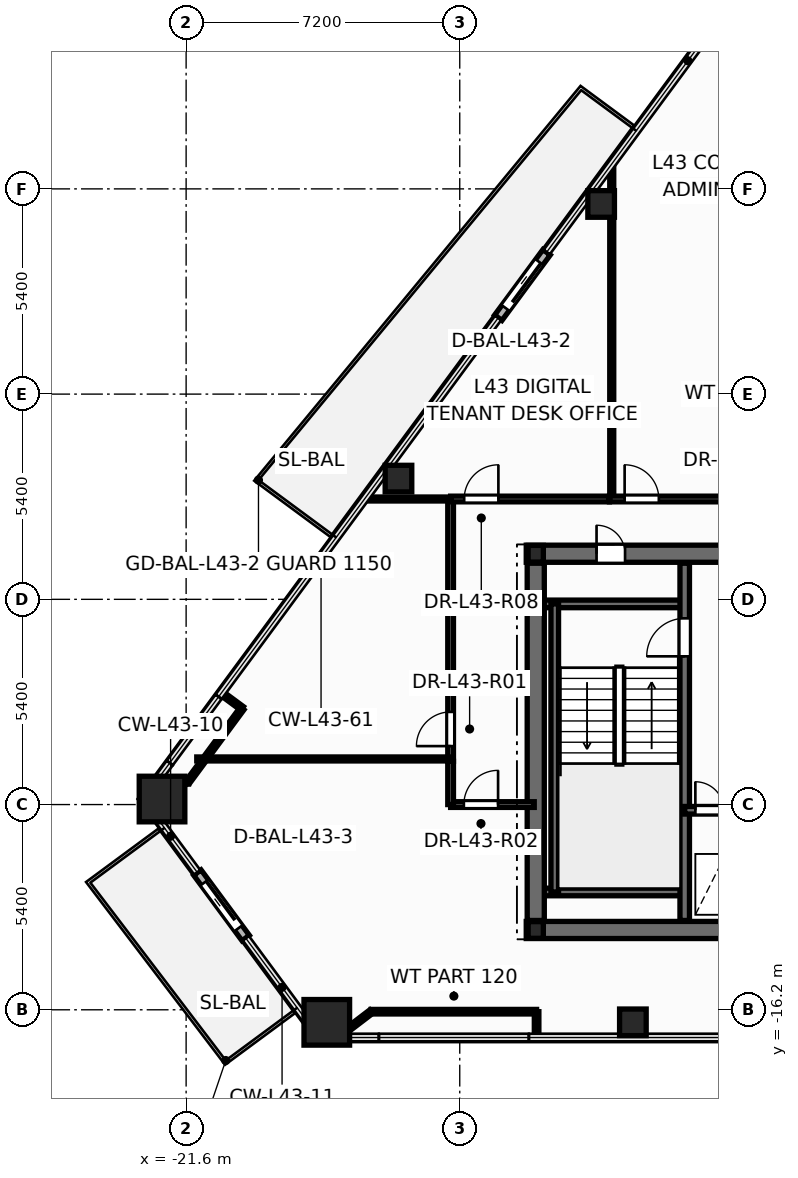
"""IFC4 building model, lengths in metres.
Left out: names, types, materials, properties, quantities, classifications, styles, units other than length and angle.
Written with IfcOpenShell. Run it as: python <this file> out.ifc"""

import sys

from ifc_helpers import new_model, si_unit, direction, frame, frame_2d, origin, origin_2d, place, context, subcontext, project, spatial, rectangle, hollow_rectangle, hollow_circle, i_section, extrude, element, fill, save


model = new_model("IFC4")
c1 = context("Model", 3, precision=1e-05, world=origin(), true_north=direction((0.0, 1.0)))
c2 = subcontext(c1, "Body", "Model", "MODEL_VIEW")
j1 = project(units=[si_unit("LENGTHUNIT", "METRE"), si_unit("PLANEANGLEUNIT", "RADIAN")], contexts=[c1])
p1 = place(None, origin())
s1 = spatial("IfcSite", under=j1, at=p1, CompositionType="ELEMENT")
p2 = place(p1, origin())
s2 = spatial("IfcBuilding", under=s1, at=p2, CompositionType="ELEMENT")
p3 = place(p2, frame((0.0, 0.0, 165.3)))
s3 = spatial("IfcBuildingStorey", under=s2, at=p3, CompositionType="ELEMENT", Elevation=165.3)
for number, where, z_axis, x_axis in (
    (1, (-22.234, -10.655, 0.0), (0.0, 0.0, 1.0), (1.0, 0.0, 0.0)),
    (2, (-17.898, -16.53, 0.0), (0.0, 0.0, 1.0), (1.0, 0.0, 0.0)),
):
    element("IfcColumn", number, at=place(p3, frame(where, z_axis=z_axis, x_axis=x_axis)), inside=s3, PredefinedType="COLUMN", context=c2, shape_type="SweptSolid", body=[
        extrude(hollow_rectangle(XDim=1.2, YDim=1.2, WallThickness=0.055, at=origin_2d()), origin(), (0.0, 0.0, 1.0), 3.6),
    ])
for number, where, z_axis, x_axis in (
    (3, (-9.844, -16.53, 0.0), (0.0, 0.0, 1.0), (1.0, 0.0, 0.0)),
    (4, (-10.679, 5.003, 0.0), (0.0, 0.0, 1.0), (1.0, 0.0, 0.0)),
    (5, (-16.012, -2.223, 0.0), (0.0, 0.0, 1.0), (1.0, 0.0, 0.0)),
):
    element("IfcColumn", number, at=place(p3, frame(where, z_axis=z_axis, x_axis=x_axis)), inside=s3, PredefinedType="COLUMN", context=c2, shape_type="SweptSolid", body=[
        extrude(hollow_circle(Radius=0.35, WallThickness=0.03, at=origin_2d()), origin(), (0.0, 0.0, 1.0), 3.6),
    ])
for number, where, z_axis, x_axis in (
    (6, (-12.4, -14.1, 0.0), (0.0, 0.0, 1.0), (1.0, 0.0, 0.0)),
    (7, (-12.4, -4.2, 0.0), (0.0, 0.0, 1.0), (1.0, 0.0, 0.0)),
):
    element("IfcColumn", number, at=place(p3, frame(where, z_axis=z_axis, x_axis=x_axis)), inside=s3, PredefinedType="COLUMN", context=c2, shape_type="SweptSolid", body=[
        extrude(i_section(OverallWidth=0.4, OverallDepth=0.44, WebThickness=0.028, FlangeThickness=0.04, at=origin_2d()), origin(), (0.0, 0.0, 1.0), 3.6),
    ])
p4 = place(p3, frame((-12.115, 3.731, -0.015), z_axis=(0.0, 0.0, 1.0), x_axis=(-0.593794270714, -0.804616905158, 0.0)))
e8 = element("IfcWall", 8, at=p4, inside=s3, PredefinedType="STANDARD", context=c2, shape_type="SweptSolid", body=[
    extrude(rectangle(XDim=2.14, YDim=0.24, at=frame_2d((1.07, 0.0))), origin(), (0.0, 0.0, 1.0), 2.737),
])
p5 = place(p4, frame((0.32, 0.0, 0.015)))
e9 = element("IfcOpeningElement", 9, at=p5, cuts=e8, PredefinedType="OPENING", context=c2, shape_type="SweptSolid", body=[
    extrude(rectangle(XDim=1.506, YDim=2.204, at=frame_2d((0.75, 1.102))), frame((0.0, 0.13, 0.0), z_axis=(0.0, -1.0, 0.0), x_axis=(1.0, 0.0, 0.0)), (0.0, 0.0, 1.0), 0.26),
])
p6 = place(p3, frame((-21.303, -12.589, -0.015), z_axis=(0.0, 0.0, 1.0), x_axis=(0.593794270714, -0.804616905158, 0.0)))
e10 = element("IfcWall", 10, at=p6, inside=s3, PredefinedType="STANDARD", context=c2, shape_type="SweptSolid", body=[
    extrude(rectangle(XDim=2.14, YDim=0.24, at=frame_2d((1.07, 0.0))), origin(), (0.0, 0.0, 1.0), 2.737),
])
p7 = place(p6, frame((0.32, 0.0, 0.015)))
e11 = element("IfcOpeningElement", 11, at=p7, cuts=e10, PredefinedType="OPENING", context=c2, shape_type="SweptSolid", body=[
    extrude(rectangle(XDim=1.506, YDim=2.204, at=frame_2d((0.75, 1.102))), frame((0.0, 0.13, 0.0), z_axis=(0.0, -1.0, 0.0), x_axis=(1.0, 0.0, 0.0)), (0.0, 0.0, 1.0), 0.26),
])
p8 = place(p3, frame((-12.65, -14.1, 0.0), z_axis=(0.0, 0.0, 1.0), x_axis=(1.0, 0.0, 0.0)))
e12 = element("IfcWall", 12, at=p8, inside=s3, PredefinedType="SHEAR", context=c2, shape_type="SweptSolid", body=[
    extrude(rectangle(XDim=25.3, YDim=0.45, at=frame_2d((12.65, 0.0))), origin(), (0.0, 0.0, 1.0), 3.6),
])
p9 = place(p3, frame((-12.65, -4.2, 0.0), z_axis=(0.0, 0.0, 1.0), x_axis=(1.0, 0.0, 0.0)))
e13 = element("IfcWall", 13, at=p9, inside=s3, PredefinedType="SHEAR", context=c2, shape_type="SweptSolid", body=[
    extrude(rectangle(XDim=25.3, YDim=0.45, at=frame_2d((12.65, 0.0))), origin(), (0.0, 0.0, 1.0), 3.6),
])
p10 = place(p9, frame((1.85, 0.0, 0.0)))
e14 = element("IfcOpeningElement", 14, at=p10, cuts=e13, PredefinedType="OPENING", context=c2, shape_type="SweptSolid", body=[
    extrude(rectangle(XDim=0.756, YDim=2.054, at=frame_2d((0.375, 1.027))), frame((0.0, 0.235, 0.0), z_axis=(0.0, -1.0, 0.0), x_axis=(1.0, 0.0, 0.0)), (0.0, 0.0, 1.0), 0.47),
])
p11 = place(p9, frame((21.85, 0.0, 0.0)))
e15 = element("IfcOpeningElement", 15, at=p11, cuts=e13, PredefinedType="OPENING", context=c2, shape_type="SweptSolid", body=[
    extrude(rectangle(XDim=0.756, YDim=2.054, at=frame_2d((0.375, 1.027))), frame((0.0, 0.235, 0.0), z_axis=(0.0, -1.0, 0.0), x_axis=(1.0, 0.0, 0.0)), (0.0, 0.0, 1.0), 0.47),
])
p12 = place(p9, frame((23.5, 0.0, 0.0)))
e16 = element("IfcOpeningElement", 16, at=p12, cuts=e13, PredefinedType="OPENING", context=c2, shape_type="SweptSolid", body=[
    extrude(rectangle(XDim=0.756, YDim=2.054, at=frame_2d((0.375, 1.027))), frame((0.0, 0.235, 0.0), z_axis=(0.0, -1.0, 0.0), x_axis=(1.0, 0.0, 0.0)), (0.0, 0.0, 1.0), 0.47),
])
p13 = place(p9, frame((5.85, 0.0, 0.0)))
e17 = element("IfcOpeningElement", 17, at=p13, cuts=e13, PredefinedType="OPENING", context=c2, shape_type="SweptSolid", body=[
    extrude(rectangle(XDim=1.006, YDim=2.104, at=frame_2d((0.5, 1.052))), frame((0.0, 0.235, 0.0), z_axis=(0.0, -1.0, 0.0), x_axis=(1.0, 0.0, 0.0)), (0.0, 0.0, 1.0), 0.47),
])
p14 = place(p9, frame((10.35, 0.0, 0.0)))
e18 = element("IfcOpeningElement", 18, at=p14, cuts=e13, PredefinedType="OPENING", context=c2, shape_type="SweptSolid", body=[
    extrude(rectangle(XDim=1.406, YDim=2.154, at=frame_2d((0.7, 1.077))), frame((0.0, 0.235, 0.0), z_axis=(0.0, -1.0, 0.0), x_axis=(1.0, 0.0, 0.0)), (0.0, 0.0, 1.0), 0.47),
])
p15 = place(p9, frame((18.45, 0.0, 0.0)))
e19 = element("IfcOpeningElement", 19, at=p15, cuts=e13, PredefinedType="OPENING", context=c2, shape_type="SweptSolid", body=[
    extrude(rectangle(XDim=1.006, YDim=2.104, at=frame_2d((0.5, 1.052))), frame((0.0, 0.235, 0.0), z_axis=(0.0, -1.0, 0.0), x_axis=(1.0, 0.0, 0.0)), (0.0, 0.0, 1.0), 0.47),
])
for number, where, z_axis, x_axis in (
    (20, (-12.35, -5.52, 0.0), (0.0, 0.0, 1.0), (1.0, 0.0, 0.0)),
    (21, (-12.35, -13.1, 0.0), (0.0, 0.0, 1.0), (1.0, 0.0, 0.0)),
):
    element("IfcWall", number, at=place(p3, frame(where, z_axis=z_axis, x_axis=x_axis)), inside=s3, PredefinedType="SOLIDWALL", context=c2, shape_type="SweptSolid", body=[
        extrude(rectangle(XDim=3.87, YDim=0.2, at=frame_2d((1.935, 0.0))), origin(), (0.0, 0.0, 1.0), 3.6),
    ])
p16 = place(p3, frame((-11.9, -13.1, 0.0), z_axis=(0.0, 0.0, 1.0), x_axis=(0.0, 1.0, 0.0)))
e22 = element("IfcWall", 22, at=p16, inside=s3, PredefinedType="SOLIDWALL", context=c2, shape_type="SweptSolid", body=[
    extrude(rectangle(XDim=7.58, YDim=0.2, at=frame_2d((3.79, 0.0))), origin(), (0.0, 0.0, 1.0), 3.6),
])
p17 = place(p3, frame((-8.48, -13.85, 0.0), z_axis=(0.0, 0.0, 1.0), x_axis=(0.0, 1.0, 0.0)))
e23 = element("IfcWall", 23, at=p17, inside=s3, PredefinedType="SHEAR", context=c2, shape_type="SweptSolid", body=[
    extrude(rectangle(XDim=9.4, YDim=0.25, at=frame_2d((4.7, 0.0))), origin(), (0.0, 0.0, 1.0), 3.6),
])
p18 = place(p17, frame((6.95, 0.0, 0.0)))
e24 = element("IfcOpeningElement", 24, at=p18, cuts=e23, PredefinedType="OPENING", context=c2, shape_type="SweptSolid", body=[
    extrude(rectangle(XDim=1.006, YDim=2.104, at=frame_2d((0.5, 1.052))), frame((0.0, 0.135, 0.0), z_axis=(0.0, -1.0, 0.0), x_axis=(1.0, 0.0, 0.0)), (0.0, 0.0, 1.0), 0.27),
])
p19 = place(p3, frame((-8.48, -10.95, 0.0), z_axis=(0.0, 0.0, 1.0), x_axis=(1.0, 0.0, 0.0)))
e25 = element("IfcWall", 25, at=p19, inside=s3, PredefinedType="SOLIDWALL", context=c2, shape_type="SweptSolid", body=[
    extrude(rectangle(XDim=3.36, YDim=0.2, at=frame_2d((1.68, 0.0))), origin(), (0.0, 0.0, 1.0), 3.6),
])
p20 = place(p19, frame((0.28, 0.0, 0.0)))
e26 = element("IfcOpeningElement", 26, at=p20, cuts=e25, PredefinedType="OPENING", context=c2, shape_type="SweptSolid", body=[
    extrude(rectangle(XDim=0.756, YDim=2.054, at=frame_2d((0.375, 1.027))), frame((0.0, 0.11, 0.0), z_axis=(0.0, -1.0, 0.0), x_axis=(1.0, 0.0, 0.0)), (0.0, 0.0, 1.0), 0.22),
])
p21 = place(p19, frame((1.85, 0.0, 0.0)))
e27 = element("IfcOpeningElement", 27, at=p21, cuts=e25, PredefinedType="OPENING", context=c2, shape_type="SweptSolid", body=[
    extrude(rectangle(XDim=1.106, YDim=2.104, at=frame_2d((0.55, 1.052))), frame((0.0, 0.11, 0.0), z_axis=(0.0, -1.0, 0.0), x_axis=(1.0, 0.0, 0.0)), (0.0, 0.0, 1.0), 0.22),
])
p22 = place(p3, frame((-12.4, -13.85, 0.0), z_axis=(0.0, 0.0, 1.0), x_axis=(0.0, 1.0, 0.0)))
e28 = element("IfcWall", 28, at=p22, inside=s3, PredefinedType="SHEAR", context=c2, shape_type="SweptSolid", body=[
    extrude(rectangle(XDim=9.4, YDim=0.45, at=frame_2d((4.7, 0.0))), origin(), (0.0, 0.0, 1.0), 3.6),
])
p23 = place(p3, frame((-10.4, -2.76, 0.0), z_axis=(0.0, 0.0, 1.0), x_axis=(0.0, 1.0, 0.0)))
e29 = element("IfcWall", 29, at=p23, inside=s3, PredefinedType="PARTITIONING", context=c2, shape_type="SweptSolid", body=[
    extrude(rectangle(XDim=8.815, YDim=0.105, at=frame_2d((4.408, 0.0))), origin(), (0.0, 0.0, 1.0), 2.547),
])
p24 = place(p3, frame((-14.64, -9.66, 0.0), z_axis=(0.0, 0.0, 1.0), x_axis=(0.0, 1.0, 0.0)))
e30 = element("IfcWall", 30, at=p24, inside=s3, PredefinedType="PARTITIONING", context=c2, shape_type="SweptSolid", body=[
    extrude(rectangle(XDim=6.9, YDim=0.15, at=frame_2d((3.45, 0.0))), origin(), (0.0, 0.0, 1.0), 2.255),
])
p25 = place(p24, frame((0.398, 0.0, 0.0)))
e31 = element("IfcOpeningElement", 31, at=p25, cuts=e30, PredefinedType="OPENING", context=c2, shape_type="SweptSolid", body=[
    extrude(rectangle(XDim=0.906, YDim=2.104, at=frame_2d((0.45, 1.052))), frame((0.0, 0.085, 0.0), z_axis=(0.0, -1.0, 0.0), x_axis=(1.0, 0.0, 0.0)), (0.0, 0.0, 1.0), 0.17),
])
p26 = place(p3, frame((-21.32, -9.6, 0.0), z_axis=(0.0, 0.0, 1.0), x_axis=(1.0, 0.0, 0.0)))
e32 = element("IfcWall", 32, at=p26, inside=s3, PredefinedType="PARTITIONING", context=c2, shape_type="SweptSolid", body=[
    extrude(rectangle(XDim=6.68, YDim=0.105, at=frame_2d((3.34, 0.0))), origin(), (0.0, 0.0, 1.0), 2.255),
])
p27 = place(p3, frame((-10.46, -2.76, 0.0), z_axis=(0.0, 0.0, 1.0), x_axis=(1.0, 0.0, 0.0)))
e33 = element("IfcWall", 33, at=p27, inside=s3, PredefinedType="PARTITIONING", context=c2, shape_type="SweptSolid", body=[
    extrude(rectangle(XDim=6.12, YDim=0.15, at=frame_2d((3.06, 0.0))), origin(), (0.0, 0.0, 1.0), 2.255),
])
p28 = place(p27, frame((0.399, 0.0, 0.0)))
e34 = element("IfcOpeningElement", 34, at=p28, cuts=e33, PredefinedType="OPENING", context=c2, shape_type="SweptSolid", body=[
    extrude(rectangle(XDim=0.906, YDim=2.104, at=frame_2d((0.45, 1.052))), frame((0.0, 0.085, 0.0), z_axis=(0.0, -1.0, 0.0), x_axis=(1.0, 0.0, 0.0)), (0.0, 0.0, 1.0), 0.17),
])
p29 = place(p3, frame((-16.731, -16.25, 0.0), z_axis=(0.0, 0.0, 1.0), x_axis=(1.0, 0.0, 0.0)))
e35 = element("IfcWall", 35, at=p29, inside=s3, PredefinedType="PARTITIONING", context=c2, shape_type="SweptSolid", body=[
    extrude(rectangle(XDim=4.354, YDim=0.12, at=frame_2d((2.177, 0.0))), origin(), (0.0, 0.0, 1.0), 3.28),
])
p30 = place(p3, frame((-14.64, -2.76, 0.0), z_axis=(0.0, 0.0, 1.0), x_axis=(1.0, 0.0, 0.0)))
e36 = element("IfcWall", 36, at=p30, inside=s3, PredefinedType="PARTITIONING", context=c2, shape_type="SweptSolid", body=[
    extrude(rectangle(XDim=4.178, YDim=0.15, at=frame_2d((2.089, 0.0))), origin(), (0.0, 0.0, 1.0), 3.28),
])
p31 = place(p30, frame((0.357, 0.0, 0.0)))
e37 = element("IfcOpeningElement", 37, at=p31, cuts=e36, PredefinedType="OPENING", context=c2, shape_type="SweptSolid", body=[
    extrude(rectangle(XDim=0.906, YDim=2.104, at=frame_2d((0.45, 1.052))), frame((0.0, 0.085, 0.0), z_axis=(0.0, -1.0, 0.0), x_axis=(1.0, 0.0, 0.0)), (0.0, 0.0, 1.0), 0.17),
])
p32 = place(p3, frame((-20.127, -8.271, 0.0), z_axis=(0.0, 0.0, 1.0), x_axis=(-0.59379125041, -0.804619134086, 0.0)))
e38 = element("IfcWall", 38, at=p32, inside=s3, PredefinedType="PARTITIONING", context=c2, shape_type="SweptSolid", body=[
    extrude(rectangle(XDim=2.404, YDim=0.12, at=frame_2d((1.202, 0.0))), origin(), (0.0, 0.0, 1.0), 2.255),
])
p33 = place(p3, frame((-16.905, -2.76, 0.0), z_axis=(0.0, 0.0, 1.0), x_axis=(1.0, 0.0, 0.0)))
e39 = element("IfcWall", 39, at=p33, inside=s3, PredefinedType="PARTITIONING", context=c2, shape_type="SweptSolid", body=[
    extrude(rectangle(XDim=2.265, YDim=0.105, at=frame_2d((1.133, 0.0))), origin(), (0.0, 0.0, 1.0), 2.722),
])
p34 = place(p3, frame((-14.64, -10.8, 0.0), z_axis=(0.0, 0.0, 1.0), x_axis=(1.0, 0.0, 0.0)))
e40 = element("IfcWall", 40, at=p34, inside=s3, PredefinedType="PARTITIONING", context=c2, shape_type="SweptSolid", body=[
    extrude(rectangle(XDim=2.2, YDim=0.15, at=frame_2d((1.1, 0.0))), origin(), (0.0, 0.0, 1.0), 2.722),
])
p35 = place(p34, frame((0.349, 0.0, 0.0)))
e41 = element("IfcOpeningElement", 41, at=p35, cuts=e40, PredefinedType="OPENING", context=c2, shape_type="SweptSolid", body=[
    extrude(rectangle(XDim=0.906, YDim=2.104, at=frame_2d((0.45, 1.052))), frame((0.0, 0.085, 0.0), z_axis=(0.0, -1.0, 0.0), x_axis=(1.0, 0.0, 0.0)), (0.0, 0.0, 1.0), 0.17),
])
p36 = place(p3, frame((-14.64, -10.8, 0.0), z_axis=(0.0, 0.0, 1.0), x_axis=(0.0, 1.0, 0.0)))
e42 = element("IfcWall", 42, at=p36, inside=s3, PredefinedType="PARTITIONING", context=c2, shape_type="SweptSolid", body=[
    extrude(rectangle(XDim=1.138, YDim=0.15, at=frame_2d((0.569, 0.0))), origin(), (0.0, 0.0, 1.0), 3.28),
])
p37 = place(p3, frame((-17.409, -16.768, 0.0), z_axis=(0.0, 0.0, 1.0), x_axis=(0.794820504859, 0.606844597122, 0.0)))
e43 = element("IfcWall", 43, at=p37, inside=s3, PredefinedType="PARTITIONING", context=c2, shape_type="SweptSolid", body=[
    extrude(rectangle(XDim=0.853, YDim=0.12, at=frame_2d((0.427, 0.0))), origin(), (0.0, 0.0, 1.0), 2.722),
])
p38 = place(p3, frame((-21.554, -10.205, 0.0), z_axis=(0.0, 0.0, 1.0), x_axis=(-0.97759630866, -0.210488615593, 0.0)))
e44 = element("IfcWall", 44, at=p38, inside=s3, PredefinedType="PARTITIONING", context=c2, shape_type="SweptSolid", body=[
    extrude(rectangle(XDim=0.851, YDim=0.12, at=frame_2d((0.426, 0.0))), origin(), (0.0, 0.0, 1.0), 2.255),
])
for number, where, z_axis, x_axis in (
    (45, (-20.666, -7.873, 0.0), (0.0, 0.0, 1.0), (0.805, -0.594, 0.0)),
    (46, (-12.378, -16.25, 0.0), (0.0, 0.0, 1.0), (0.0, -1.0, 0.0)),
):
    element("IfcWall", number, at=place(p3, frame(where, z_axis=z_axis, x_axis=x_axis)), inside=s3, PredefinedType="PARTITIONING", context=c2, shape_type="SweptSolid", body=[
        extrude(rectangle(XDim=0.67, YDim=0.12, at=frame_2d((0.335, 0.0))), origin(), (0.0, 0.0, 1.0), 2.722),
    ])
p39 = place(p5, origin())
e47 = element("IfcDoor", 47, at=p39, inside=s3, OperationType="SLIDING_TO_RIGHT", PredefinedType="DOOR", context=c2, shape_type="SweptSolid", body=[
    extrude(rectangle(XDim=1.5, YDim=2.2, at=frame_2d((0.75, 1.1))), frame((0.0, 0.025, 0.0), z_axis=(0.0, -1.0, 0.0), x_axis=(1.0, 0.0, 0.0)), (0.0, 0.0, 1.0), 0.05),
])
fill(e9, e47)
p40 = place(p7, origin())
e48 = element("IfcDoor", 48, at=p40, inside=s3, OperationType="SLIDING_TO_RIGHT", PredefinedType="DOOR", context=c2, shape_type="SweptSolid", body=[
    extrude(rectangle(XDim=1.5, YDim=2.2, at=frame_2d((0.75, 1.1))), frame((0.0, 0.025, 0.0), z_axis=(0.0, -1.0, 0.0), x_axis=(1.0, 0.0, 0.0)), (0.0, 0.0, 1.0), 0.05),
])
fill(e11, e48)
p41 = place(p18, origin())
e49 = element("IfcDoor", 49, at=p41, inside=s3, OperationType="SINGLE_SWING_LEFT", PredefinedType="DOOR", context=c2, shape_type="SweptSolid", body=[
    extrude(rectangle(XDim=1.0, YDim=2.1, at=frame_2d((0.5, 1.05))), frame((0.0, 0.025, 0.0), z_axis=(0.0, -1.0, 0.0), x_axis=(1.0, 0.0, 0.0)), (0.0, 0.0, 1.0), 0.05),
])
fill(e24, e49)
p42 = place(p20, origin())
e50 = element("IfcDoor", 50, at=p42, inside=s3, OperationType="SINGLE_SWING_LEFT", PredefinedType="DOOR", context=c2, shape_type="SweptSolid", body=[
    extrude(rectangle(XDim=0.75, YDim=2.05, at=frame_2d((0.375, 1.025))), frame((0.0, 0.025, 0.0), z_axis=(0.0, -1.0, 0.0), x_axis=(1.0, 0.0, 0.0)), (0.0, 0.0, 1.0), 0.05),
])
fill(e26, e50)
p43 = place(p10, origin())
e51 = element("IfcDoor", 51, at=p43, inside=s3, OperationType="SINGLE_SWING_LEFT", PredefinedType="DOOR", context=c2, shape_type="SweptSolid", body=[
    extrude(rectangle(XDim=0.75, YDim=2.05, at=frame_2d((0.375, 1.025))), frame((0.0, 0.025, 0.0), z_axis=(0.0, -1.0, 0.0), x_axis=(1.0, 0.0, 0.0)), (0.0, 0.0, 1.0), 0.05),
])
fill(e14, e51)
p44 = place(p25, origin())
e52 = element("IfcDoor", 52, at=p44, inside=s3, OperationType="SINGLE_SWING_LEFT", PredefinedType="DOOR", context=c2, shape_type="SweptSolid", body=[
    extrude(rectangle(XDim=0.9, YDim=2.1, at=frame_2d((0.45, 1.05))), frame((0.0, 0.025, 0.0), z_axis=(0.0, -1.0, 0.0), x_axis=(1.0, 0.0, 0.0)), (0.0, 0.0, 1.0), 0.05),
])
fill(e31, e52)
p45 = place(p35, origin())
e53 = element("IfcDoor", 53, at=p45, inside=s3, OperationType="SINGLE_SWING_RIGHT", PredefinedType="DOOR", context=c2, shape_type="SweptSolid", body=[
    extrude(rectangle(XDim=0.9, YDim=2.1, at=frame_2d((0.45, 1.05))), frame((0.0, 0.025, 0.0), z_axis=(0.0, -1.0, 0.0), x_axis=(1.0, 0.0, 0.0)), (0.0, 0.0, 1.0), 0.05),
])
fill(e41, e53)
p46 = place(p31, origin())
e54 = element("IfcDoor", 54, at=p46, inside=s3, OperationType="SINGLE_SWING_RIGHT", PredefinedType="DOOR", context=c2, shape_type="SweptSolid", body=[
    extrude(rectangle(XDim=0.9, YDim=2.1, at=frame_2d((0.45, 1.05))), frame((0.0, 0.025, 0.0), z_axis=(0.0, -1.0, 0.0), x_axis=(1.0, 0.0, 0.0)), (0.0, 0.0, 1.0), 0.05),
])
fill(e37, e54)
p47 = place(p28, origin())
e55 = element("IfcDoor", 55, at=p47, inside=s3, OperationType="SINGLE_SWING_LEFT", PredefinedType="DOOR", context=c2, shape_type="SweptSolid", body=[
    extrude(rectangle(XDim=0.9, YDim=2.1, at=frame_2d((0.45, 1.05))), frame((0.0, 0.025, 0.0), z_axis=(0.0, -1.0, 0.0), x_axis=(1.0, 0.0, 0.0)), (0.0, 0.0, 1.0), 0.05),
])
fill(e34, e55)
save(model, sys.argv[1])
